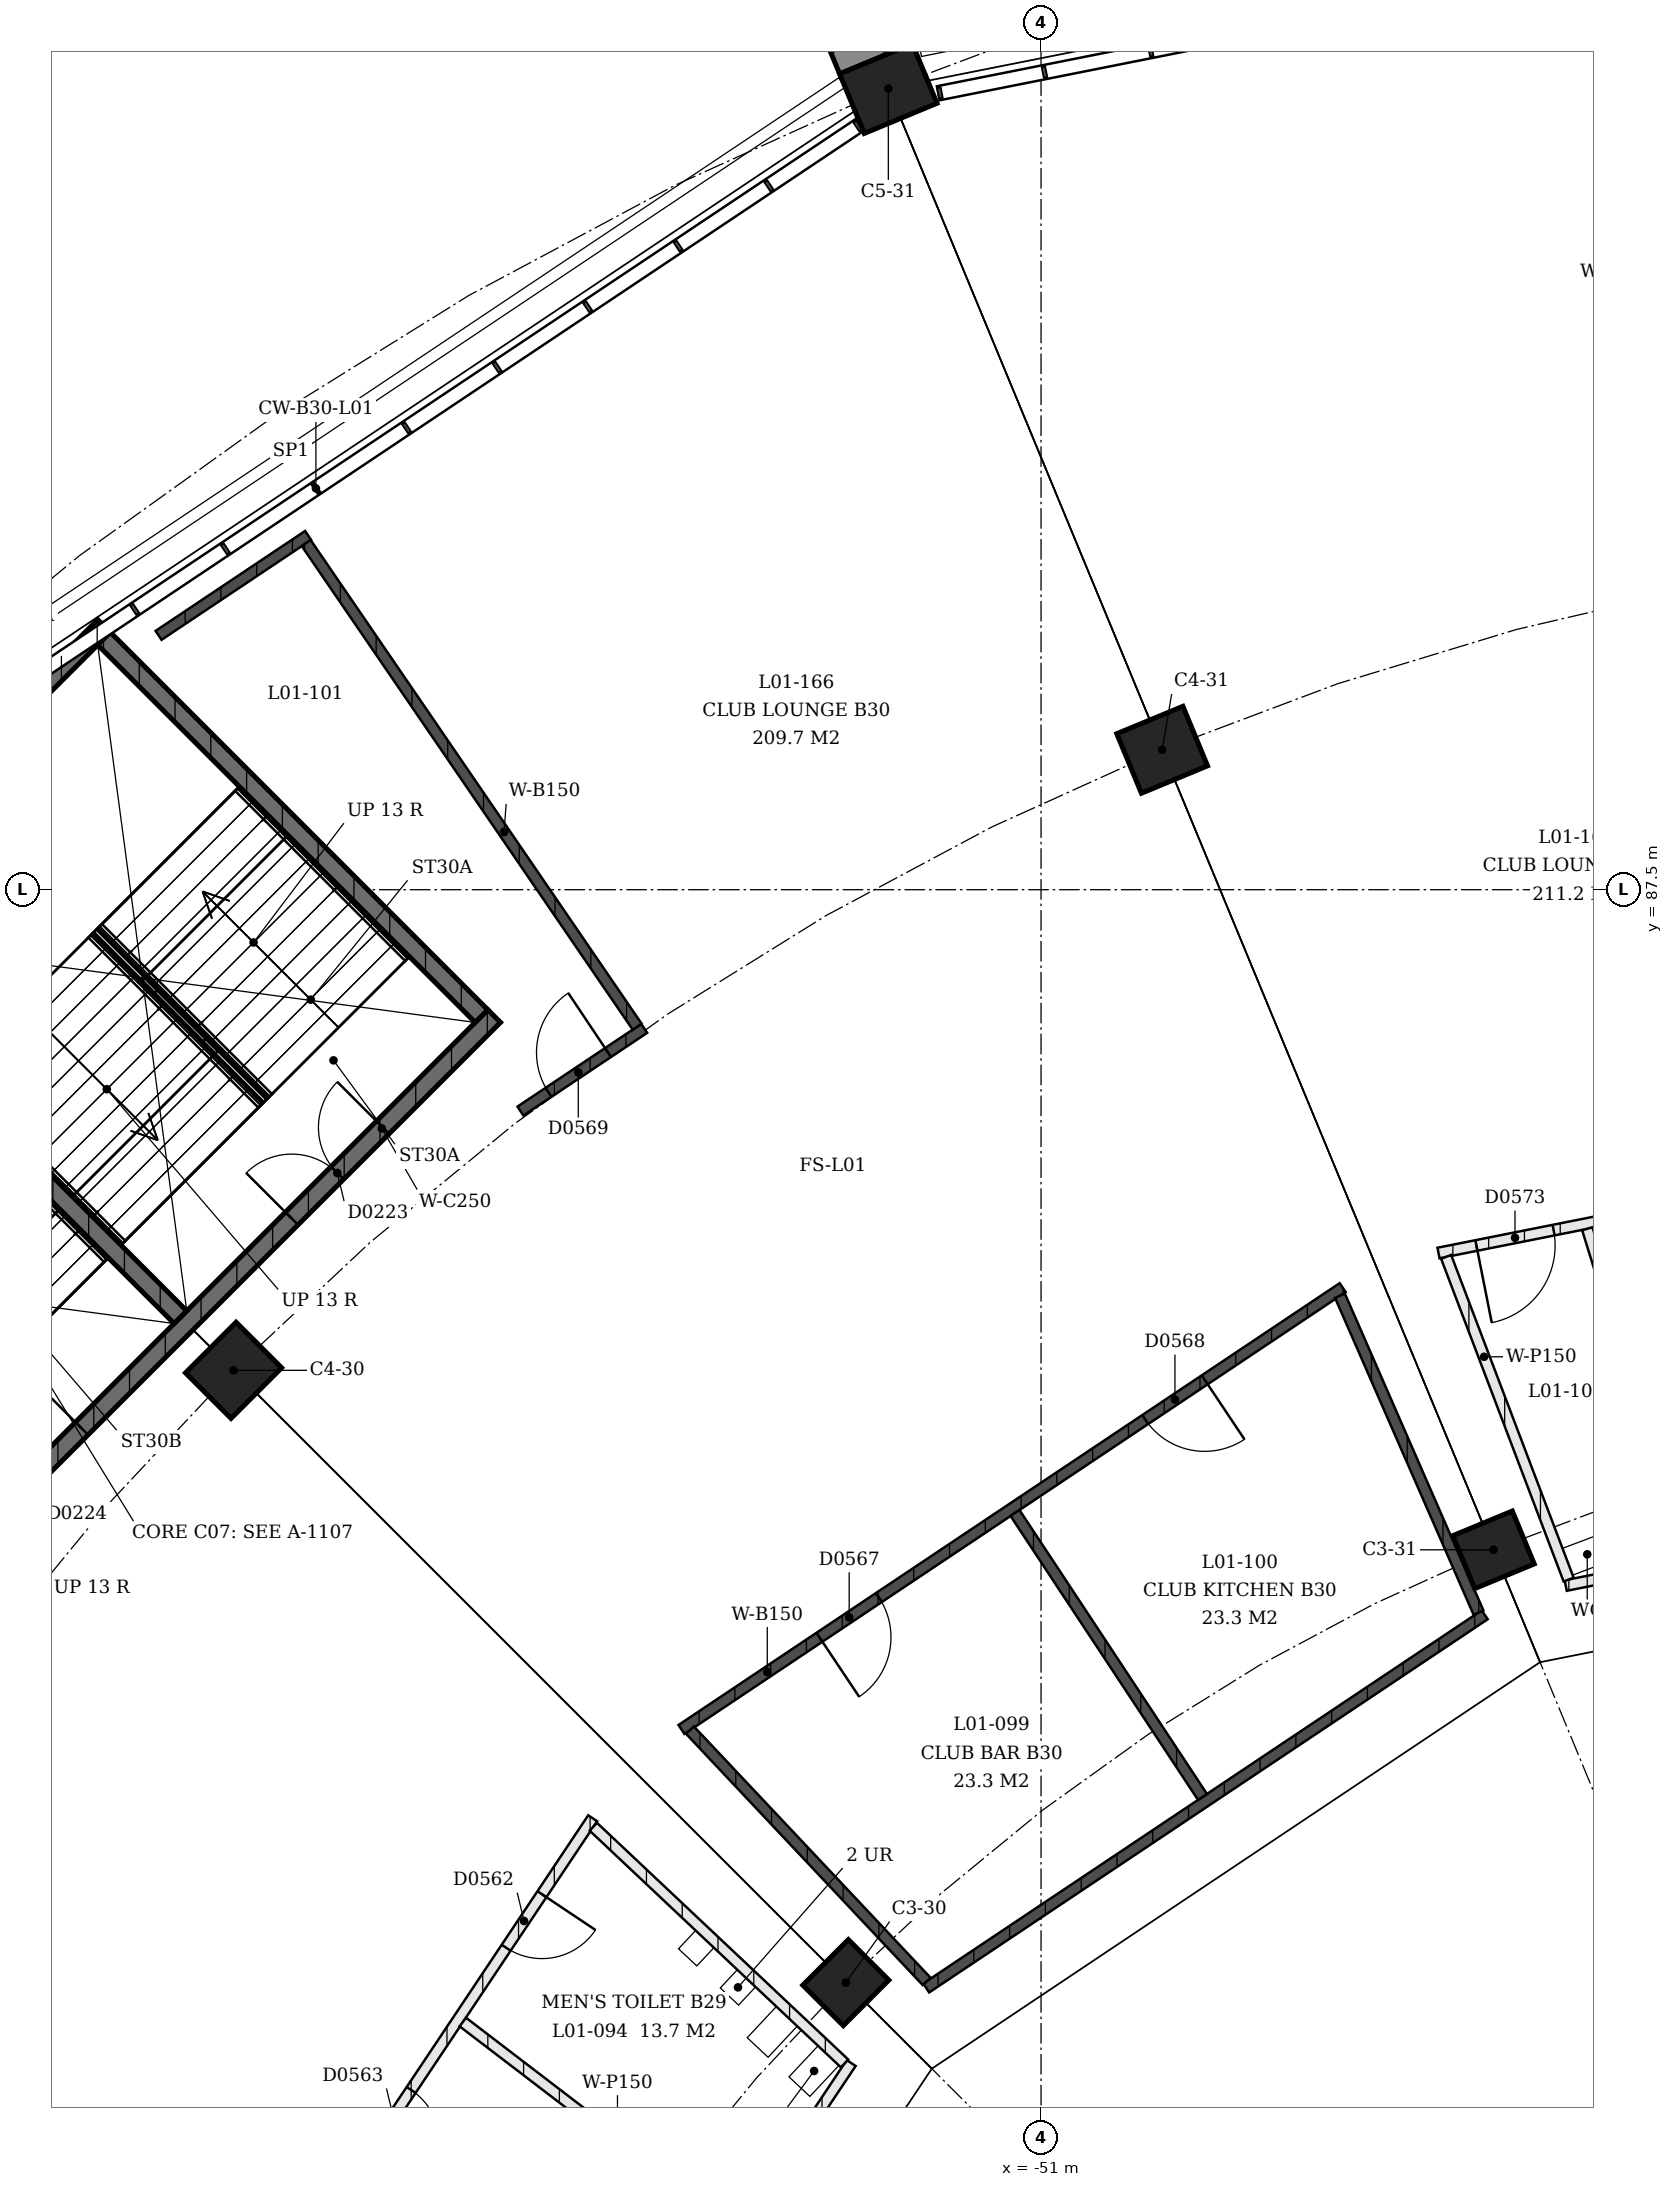
"""IFC4 building model, lengths in metres.
Left out: names, types, materials, properties, quantities, classifications, styles, units other than length and angle.
Written with IfcOpenShell. Run it as: python <this file> out.ifc"""

import sys

from ifc_helpers import new_model, si_unit, direction, frame, frame_2d, origin, origin_2d, place, context, subcontext, project, spatial, rectangle, extrude, element, fill, save


model = new_model("IFC4")
c1 = context("Model", 3, precision=1e-05, world=origin(), true_north=direction((0.0, 1.0)))
c2 = subcontext(c1, "Body", "Model", "MODEL_VIEW")
j1 = project(units=[si_unit("LENGTHUNIT", "METRE"), si_unit("PLANEANGLEUNIT", "RADIAN")], contexts=[c1])
p1 = place(None, origin())
s1 = spatial("IfcSite", under=j1, at=p1, CompositionType="ELEMENT")
p2 = place(p1, origin())
s2 = spatial("IfcBuilding", under=s1, at=p2, CompositionType="ELEMENT")
p3 = place(p2, frame((0.0, 0.0, 4.5)))
s3 = spatial("IfcBuildingStorey", under=s2, at=p3, CompositionType="ELEMENT", Elevation=4.5)
p4 = place(p3, frame((-53.728, 72.228, 0.0), z_axis=(0.0, 0.0, 1.0), x_axis=(-0.707106781187, -0.707106781187, 0.0)))
e1 = element("IfcColumn", 1, at=p4, inside=s3, PredefinedType="COLUMN", context=c2, shape_type="SweptSolid", body=[
    extrude(rectangle(XDim=0.9, YDim=0.8, at=origin_2d()), origin(), (0.0, 0.0, 1.0), 4.5),
])
p5 = place(p3, frame((-62.284, 80.784, 0.0), z_axis=(0.0, 0.0, 1.0), x_axis=(-0.707106781187, -0.707106781187, 0.0)))
e2 = element("IfcColumn", 2, at=p5, inside=s3, PredefinedType="COLUMN", context=c2, shape_type="SweptSolid", body=[
    extrude(rectangle(XDim=1.0, YDim=0.9, at=origin_2d()), origin(), (0.0, 0.0, 1.0), 4.5),
])
p6 = place(p3, frame((-44.677, 78.276, 0.0), z_axis=(0.0, 0.0, 1.0), x_axis=(-0.923879532511, -0.382683432365, 0.0)))
e3 = element("IfcColumn", 3, at=p6, inside=s3, PredefinedType="COLUMN", context=c2, shape_type="SweptSolid", body=[
    extrude(rectangle(XDim=0.9, YDim=0.8, at=origin_2d()), origin(), (0.0, 0.0, 1.0), 4.5),
])
p7 = place(p3, frame((-49.307, 89.455, 0.0), z_axis=(0.0, 0.0, 1.0), x_axis=(-0.923879532511, -0.382683432365, 0.0)))
e4 = element("IfcColumn", 4, at=p7, inside=s3, PredefinedType="COLUMN", context=c2, shape_type="SweptSolid", body=[
    extrude(rectangle(XDim=1.0, YDim=0.9, at=origin_2d()), origin(), (0.0, 0.0, 1.0), 4.5),
])
p8 = place(p3, frame((-53.134, 98.694, 0.0), z_axis=(0.0, 0.0, 1.0), x_axis=(-0.923879532511, -0.382683432365, 0.0)))
e5 = element("IfcColumn", 5, at=p8, inside=s3, PredefinedType="COLUMN", context=c2, shape_type="SweptSolid", body=[
    extrude(rectangle(XDim=1.1, YDim=0.9, at=origin_2d()), origin(), (0.0, 0.0, 1.0), 4.5),
])
p9 = place(p3, frame((-58.643, 85.734, 0.0), z_axis=(0.0, 0.0, 1.0), x_axis=(-0.707106781187, -0.707106781187, 0.0)))
e6 = element("IfcWall", 6, at=p9, inside=s3, PredefinedType="SHEAR", context=c2, shape_type="SweptSolid", body=[
    extrude(rectangle(XDim=12.15, YDim=0.25, at=frame_2d((6.075, 0.0))), origin(), (0.0, 0.0, 1.0), 4.09),
])
p10 = place(p9, frame((2.2, 0.0, 0.0)))
e7 = element("IfcOpeningElement", 7, at=p10, cuts=e6, PredefinedType="OPENING", context=c2, shape_type="SweptSolid", body=[
    extrude(rectangle(XDim=1.8, YDim=2.1, at=frame_2d((0.9, 1.05))), frame((0.0, 0.125, 0.0), z_axis=(0.0, -1.0, 0.0), x_axis=(1.0, 0.0, 0.0)), (0.0, 0.0, 1.0), 0.25),
])
p11 = place(p9, frame((8.15, 0.0, 0.0)))
e8 = element("IfcOpeningElement", 8, at=p11, cuts=e6, PredefinedType="OPENING", context=c2, shape_type="SweptSolid", body=[
    extrude(rectangle(XDim=1.8, YDim=2.1, at=frame_2d((0.9, 1.05))), frame((0.0, 0.125, 0.0), z_axis=(0.0, -1.0, 0.0), x_axis=(1.0, 0.0, 0.0)), (0.0, 0.0, 1.0), 0.25),
])
p12 = place(p3, frame((-64.094, 91.186, 0.0), z_axis=(0.0, 0.0, 1.0), x_axis=(-0.707106781187, -0.707106781187, 0.0)))
e9 = element("IfcWall", 9, at=p12, inside=s3, PredefinedType="SHEAR", context=c2, shape_type="SweptSolid", body=[
    extrude(rectangle(XDim=12.15, YDim=0.25, at=frame_2d((6.075, 0.0))), origin(), (0.0, 0.0, 1.0), 4.09),
])
p13 = place(p3, frame((-58.819, 85.734, 0.0), z_axis=(0.0, 0.0, 1.0), x_axis=(-0.707123144286, 0.707090417709, 0.0)))
e10 = element("IfcWall", 10, at=p13, inside=s3, PredefinedType="SHEAR", context=c2, shape_type="SweptSolid", body=[
    extrude(rectangle(XDim=7.46, YDim=0.25, at=frame_2d((3.73, 0.0))), origin(), (0.0, 0.0, 1.0), 4.09),
])
p14 = place(p3, frame((-63.027, 81.527, 0.0), z_axis=(0.0, 0.0, 1.0), x_axis=(-0.707106781187, 0.707106781187, 0.0)))
e11 = element("IfcWall", 11, at=p14, inside=s3, PredefinedType="SHEAR", context=c2, shape_type="SweptSolid", body=[
    extrude(rectangle(XDim=7.46, YDim=0.25, at=frame_2d((3.73, 0.0))), origin(), (0.0, 0.0, 1.0), 4.09),
])
p15 = place(p3, frame((-53.653, 71.105, 0.0), z_axis=(0.0, 0.0, 1.0), x_axis=(-0.555566497886, -0.831472108027, 0.0)))
e12 = element("IfcWall", 12, at=p15, inside=s3, PredefinedType="PARTITIONING", context=c2, shape_type="SweptSolid", body=[
    extrude(rectangle(XDim=9.102, YDim=0.15, at=frame_2d((4.551, 0.0))), origin(), (0.0, 0.0, 1.0), 3.0),
])
p16 = place(p3, frame((-57.266, 74.525, 0.0), z_axis=(0.0, 0.0, 1.0), x_axis=(-0.555562662276, -0.831474670862, 0.0)))
e13 = element("IfcWall", 13, at=p16, inside=s3, PredefinedType="PARTITIONING", context=c2, shape_type="SweptSolid", body=[
    extrude(rectangle(XDim=10.775, YDim=0.15, at=frame_2d((5.387, 0.0))), origin(), (0.0, 0.0, 1.0), 3.0),
])
p17 = place(p16, frame((1.276, 0.0, 0.0)))
e14 = element("IfcOpeningElement", 14, at=p17, cuts=e13, PredefinedType="OPENING", context=c2, shape_type="SweptSolid", body=[
    extrude(rectangle(XDim=0.9, YDim=2.1, at=frame_2d((0.45, 1.05))), frame((0.0, 0.075, 0.0), z_axis=(0.0, -1.0, 0.0), x_axis=(1.0, 0.0, 0.0)), (0.0, 0.0, 1.0), 0.15),
])
p18 = place(p16, frame((4.566, 0.0, 0.0)))
e15 = element("IfcOpeningElement", 15, at=p18, cuts=e13, PredefinedType="OPENING", context=c2, shape_type="SweptSolid", body=[
    extrude(rectangle(XDim=0.9, YDim=2.1, at=frame_2d((0.45, 1.05))), frame((0.0, 0.075, 0.0), z_axis=(0.0, -1.0, 0.0), x_axis=(1.0, 0.0, 0.0)), (0.0, 0.0, 1.0), 0.15),
])
p19 = place(p16, frame((7.119, 0.0, 0.0)))
e16 = element("IfcOpeningElement", 16, at=p19, cuts=e13, PredefinedType="OPENING", context=c2, shape_type="SweptSolid", body=[
    extrude(rectangle(XDim=1.1, YDim=2.1, at=frame_2d((0.55, 1.05))), frame((0.0, 0.075, 0.0), z_axis=(0.0, -1.0, 0.0), x_axis=(1.0, 0.0, 0.0)), (0.0, 0.0, 1.0), 0.15),
])
p20 = place(p16, frame((9.135, 0.0, 0.0)))
e17 = element("IfcOpeningElement", 17, at=p20, cuts=e13, PredefinedType="OPENING", context=c2, shape_type="SweptSolid", body=[
    extrude(rectangle(XDim=1.1, YDim=2.1, at=frame_2d((0.55, 1.05))), frame((0.0, 0.075, 0.0), z_axis=(0.0, -1.0, 0.0), x_axis=(1.0, 0.0, 0.0)), (0.0, 0.0, 1.0), 0.15),
])
p21 = place(p3, frame((-53.746, 71.099, 0.0), z_axis=(0.0, 0.0, 1.0), x_axis=(-0.727898273696, 0.685685134118, 0.0)))
e18 = element("IfcWall", 18, at=p21, inside=s3, PredefinedType="PARTITIONING", context=c2, shape_type="SweptSolid", body=[
    extrude(rectangle(XDim=4.823, YDim=0.15, at=frame_2d((2.412, 0.0))), origin(), (0.0, 0.0, 1.0), 3.0),
])
p22 = place(p3, frame((-55.294, 68.782, 0.0), z_axis=(0.0, 0.0, 1.0), x_axis=(-0.794378186515, 0.607423490482, 0.0)))
e19 = element("IfcWall", 19, at=p22, inside=s3, PredefinedType="PARTITIONING", context=c2, shape_type="SweptSolid", body=[
    extrude(rectangle(XDim=4.766, YDim=0.15, at=frame_2d((2.383, 0.0))), origin(), (0.0, 0.0, 1.0), 3.0),
])
p23 = place(p3, frame((-52.605, 72.153, 0.0), z_axis=(0.0, 0.0, 1.0), x_axis=(0.831461674059, 0.555582113257, 0.0)))
e20 = element("IfcWall", 20, at=p23, inside=s3, PredefinedType="SOLIDWALL", context=c2, shape_type="SweptSolid", body=[
    extrude(rectangle(XDim=9.388, YDim=0.15, at=frame_2d((4.694, 0.0))), origin(), (0.0, 0.0, 1.0), 3.0),
])
p24 = place(p3, frame((-56.025, 75.766, 0.0), z_axis=(0.0, 0.0, 1.0), x_axis=(0.831478677095, 0.55555666636, 0.0)))
e21 = element("IfcWall", 21, at=p24, inside=s3, PredefinedType="SOLIDWALL", context=c2, shape_type="SweptSolid", body=[
    extrude(rectangle(XDim=11.113, YDim=0.15, at=frame_2d((5.557, 0.0))), origin(), (0.0, 0.0, 1.0), 3.0),
])
p25 = place(p24, frame((2.319, 0.0, 0.0)))
e22 = element("IfcOpeningElement", 22, at=p25, cuts=e21, PredefinedType="OPENING", context=c2, shape_type="SweptSolid", body=[
    extrude(rectangle(XDim=1.0, YDim=2.1, at=frame_2d((0.5, 1.05))), frame((0.0, 0.075, 0.0), z_axis=(0.0, -1.0, 0.0), x_axis=(1.0, 0.0, 0.0)), (0.0, 0.0, 1.0), 0.15),
])
p26 = place(p24, frame((7.794, 0.0, 0.0)))
e23 = element("IfcOpeningElement", 23, at=p26, cuts=e21, PredefinedType="OPENING", context=c2, shape_type="SweptSolid", body=[
    extrude(rectangle(XDim=1.0, YDim=2.1, at=frame_2d((0.5, 1.05))), frame((0.0, 0.075, 0.0), z_axis=(0.0, -1.0, 0.0), x_axis=(1.0, 0.0, 0.0)), (0.0, 0.0, 1.0), 0.15),
])
p27 = place(p3, frame((-52.599, 72.246, 0.0), z_axis=(0.0, 0.0, 1.0), x_axis=(-0.685685134118, 0.727898273696, 0.0)))
e24 = element("IfcWall", 24, at=p27, inside=s3, PredefinedType="SOLIDWALL", context=c2, shape_type="SweptSolid", body=[
    extrude(rectangle(XDim=4.823, YDim=0.15, at=frame_2d((2.412, 0.0))), origin(), (0.0, 0.0, 1.0), 3.0),
])
p28 = place(p3, frame((-48.743, 74.822, 0.0), z_axis=(0.0, 0.0, 1.0), x_axis=(-0.551118175735, 0.834427202561, 0.0)))
e25 = element("IfcWall", 25, at=p28, inside=s3, PredefinedType="SOLIDWALL", context=c2, shape_type="SweptSolid", body=[
    extrude(rectangle(XDim=4.757, YDim=0.15, at=frame_2d((2.378, 0.0))), origin(), (0.0, 0.0, 1.0), 3.0),
])
p29 = place(p3, frame((-44.886, 77.399, 0.0), z_axis=(0.0, 0.0, 1.0), x_axis=(-0.400646552146, 0.916232688924, 0.0)))
e26 = element("IfcWall", 26, at=p29, inside=s3, PredefinedType="SOLIDWALL", context=c2, shape_type="SweptSolid", body=[
    extrude(rectangle(XDim=4.832, YDim=0.15, at=frame_2d((2.416, 0.0))), origin(), (0.0, 0.0, 1.0), 3.0),
])
p30 = place(p3, frame((-58.275, 84.407, 0.0), z_axis=(0.0, 0.0, 1.0), x_axis=(0.831526298134, 0.555485387307, 0.0)))
e27 = element("IfcWall", 27, at=p30, inside=s3, PredefinedType="SOLIDWALL", context=c2, shape_type="SweptSolid", body=[
    extrude(rectangle(XDim=2.08, YDim=0.15, at=frame_2d((1.04, 0.0))), origin(), (0.0, 0.0, 1.0), 3.0),
])
p31 = place(p30, frame((0.472, 0.0, 0.0)))
e28 = element("IfcOpeningElement", 28, at=p31, cuts=e27, PredefinedType="OPENING", context=c2, shape_type="SweptSolid", body=[
    extrude(rectangle(XDim=1.0, YDim=2.1, at=frame_2d((0.5, 1.05))), frame((0.0, 0.075, 0.0), z_axis=(0.0, -1.0, 0.0), x_axis=(1.0, 0.0, 0.0)), (0.0, 0.0, 1.0), 0.15),
])
p32 = place(p3, frame((-63.333, 91.054, 0.0), z_axis=(0.0, 0.0, 1.0), x_axis=(0.831482054195, 0.555551611961, 0.0)))
e29 = element("IfcWall", 29, at=p32, inside=s3, PredefinedType="SOLIDWALL", context=c2, shape_type="SweptSolid", body=[
    extrude(rectangle(XDim=2.514, YDim=0.15, at=frame_2d((1.257, 0.0))), origin(), (0.0, 0.0, 1.0), 3.0),
])
p33 = place(p3, frame((-56.644, 85.585, 0.0), z_axis=(0.0, 0.0, 1.0), x_axis=(-0.564785434986, 0.825237791444, 0.0)))
e30 = element("IfcWall", 30, at=p33, inside=s3, PredefinedType="SOLIDWALL", context=c2, shape_type="SweptSolid", body=[
    extrude(rectangle(XDim=8.19, YDim=0.15, at=frame_2d((4.095, 0.0))), origin(), (0.0, 0.0, 1.0), 3.0),
])
p34 = place(p3, frame((-34.741, 79.552, 0.0), z_axis=(0.0, 0.0, 1.0), x_axis=(-0.980786464492, -0.195084369103, 0.0)))
e31 = element("IfcWall", 31, at=p34, inside=s3, PredefinedType="PARTITIONING", context=c2, shape_type="SweptSolid", body=[
    extrude(rectangle(XDim=9.102, YDim=0.15, at=frame_2d((4.551, 0.0))), origin(), (0.0, 0.0, 1.0), 3.0),
])
p35 = place(p3, frame((-34.877, 84.525, 0.0), z_axis=(0.0, 0.0, 1.0), x_axis=(-0.98078580384, -0.195087690502, 0.0)))
e32 = element("IfcWall", 32, at=p35, inside=s3, PredefinedType="PARTITIONING", context=c2, shape_type="SweptSolid", body=[
    extrude(rectangle(XDim=10.775, YDim=0.15, at=frame_2d((5.387, 0.0))), origin(), (0.0, 0.0, 1.0), 3.0),
])
p36 = place(p35, frame((1.276, 0.0, 0.0)))
e33 = element("IfcOpeningElement", 33, at=p36, cuts=e32, PredefinedType="OPENING", context=c2, shape_type="SweptSolid", body=[
    extrude(rectangle(XDim=0.9, YDim=2.1, at=frame_2d((0.45, 1.05))), frame((0.0, 0.075, 0.0), z_axis=(0.0, -1.0, 0.0), x_axis=(1.0, 0.0, 0.0)), (0.0, 0.0, 1.0), 0.15),
])
p37 = place(p35, frame((4.566, 0.0, 0.0)))
e34 = element("IfcOpeningElement", 34, at=p37, cuts=e32, PredefinedType="OPENING", context=c2, shape_type="SweptSolid", body=[
    extrude(rectangle(XDim=0.9, YDim=2.1, at=frame_2d((0.45, 1.05))), frame((0.0, 0.075, 0.0), z_axis=(0.0, -1.0, 0.0), x_axis=(1.0, 0.0, 0.0)), (0.0, 0.0, 1.0), 0.15),
])
p38 = place(p35, frame((7.119, 0.0, 0.0)))
e35 = element("IfcOpeningElement", 35, at=p38, cuts=e32, PredefinedType="OPENING", context=c2, shape_type="SweptSolid", body=[
    extrude(rectangle(XDim=1.1, YDim=2.1, at=frame_2d((0.55, 1.05))), frame((0.0, 0.075, 0.0), z_axis=(0.0, -1.0, 0.0), x_axis=(1.0, 0.0, 0.0)), (0.0, 0.0, 1.0), 0.15),
])
p39 = place(p35, frame((9.135, 0.0, 0.0)))
e36 = element("IfcOpeningElement", 36, at=p39, cuts=e32, PredefinedType="OPENING", context=c2, shape_type="SweptSolid", body=[
    extrude(rectangle(XDim=1.1, YDim=2.1, at=frame_2d((0.55, 1.05))), frame((0.0, 0.075, 0.0), z_axis=(0.0, -1.0, 0.0), x_axis=(1.0, 0.0, 0.0)), (0.0, 0.0, 1.0), 0.15),
])
p40 = place(p3, frame((-41.952, 78.193, 0.0), z_axis=(0.0, 0.0, 1.0), x_axis=(-0.295678182088, 0.955287607288, 0.0)))
e37 = element("IfcWall", 37, at=p40, inside=s3, PredefinedType="PARTITIONING", context=c2, shape_type="SweptSolid", body=[
    extrude(rectangle(XDim=4.782, YDim=0.15, at=frame_2d((2.391, 0.0))), origin(), (0.0, 0.0, 1.0), 3.0),
])
p41 = place(p3, frame((-43.627, 77.86, 0.0), z_axis=(0.0, 0.0, 1.0), x_axis=(-0.354909029819, 0.934900839957, 0.0)))
e38 = element("IfcWall", 38, at=p41, inside=s3, PredefinedType="PARTITIONING", context=c2, shape_type="SweptSolid", body=[
    extrude(rectangle(XDim=4.823, YDim=0.15, at=frame_2d((2.412, 0.0))), origin(), (0.0, 0.0, 1.0), 3.0),
])
p42 = place(p10, origin())
e39 = element("IfcDoor", 39, at=p42, inside=s3, OperationType="DOUBLE_DOOR_SINGLE_SWING", PredefinedType="DOOR", context=c2, shape_type="SweptSolid", body=[
    extrude(rectangle(XDim=1.8, YDim=2.1, at=frame_2d((0.9, 1.05))), frame((0.0, 0.025, 0.0), z_axis=(0.0, -1.0, 0.0), x_axis=(1.0, 0.0, 0.0)), (0.0, 0.0, 1.0), 0.05),
])
fill(e7, e39)
p43 = place(p11, origin())
e40 = element("IfcDoor", 40, at=p43, inside=s3, OperationType="DOUBLE_DOOR_SINGLE_SWING", PredefinedType="DOOR", context=c2, shape_type="SweptSolid", body=[
    extrude(rectangle(XDim=1.8, YDim=2.1, at=frame_2d((0.9, 1.05))), frame((0.0, 0.025, 0.0), z_axis=(0.0, -1.0, 0.0), x_axis=(1.0, 0.0, 0.0)), (0.0, 0.0, 1.0), 0.05),
])
fill(e8, e40)
p44 = place(p17, origin())
e41 = element("IfcDoor", 41, at=p44, inside=s3, OperationType="SINGLE_SWING_RIGHT", PredefinedType="DOOR", context=c2, shape_type="SweptSolid", body=[
    extrude(rectangle(XDim=0.9, YDim=2.1, at=frame_2d((0.45, 1.05))), frame((0.0, 0.025, 0.0), z_axis=(0.0, -1.0, 0.0), x_axis=(1.0, 0.0, 0.0)), (0.0, 0.0, 1.0), 0.05),
])
fill(e14, e41)
p45 = place(p18, origin())
e42 = element("IfcDoor", 42, at=p45, inside=s3, OperationType="SINGLE_SWING_LEFT", PredefinedType="DOOR", context=c2, shape_type="SweptSolid", body=[
    extrude(rectangle(XDim=0.9, YDim=2.1, at=frame_2d((0.45, 1.05))), frame((0.0, 0.025, 0.0), z_axis=(0.0, -1.0, 0.0), x_axis=(1.0, 0.0, 0.0)), (0.0, 0.0, 1.0), 0.05),
])
fill(e15, e42)
p46 = place(p25, origin())
e43 = element("IfcDoor", 43, at=p46, inside=s3, OperationType="SINGLE_SWING_LEFT", PredefinedType="DOOR", context=c2, shape_type="SweptSolid", body=[
    extrude(rectangle(XDim=1.0, YDim=2.1, at=frame_2d((0.5, 1.05))), frame((0.0, 0.025, 0.0), z_axis=(0.0, -1.0, 0.0), x_axis=(1.0, 0.0, 0.0)), (0.0, 0.0, 1.0), 0.05),
])
fill(e22, e43)
p47 = place(p26, origin())
e44 = element("IfcDoor", 44, at=p47, inside=s3, OperationType="SINGLE_SWING_RIGHT", PredefinedType="DOOR", context=c2, shape_type="SweptSolid", body=[
    extrude(rectangle(XDim=1.0, YDim=2.1, at=frame_2d((0.5, 1.05))), frame((0.0, 0.025, 0.0), z_axis=(0.0, -1.0, 0.0), x_axis=(1.0, 0.0, 0.0)), (0.0, 0.0, 1.0), 0.05),
])
fill(e23, e44)
p48 = place(p31, origin())
e45 = element("IfcDoor", 45, at=p48, inside=s3, OperationType="SINGLE_SWING_LEFT", PredefinedType="DOOR", context=c2, shape_type="SweptSolid", body=[
    extrude(rectangle(XDim=1.0, YDim=2.1, at=frame_2d((0.5, 1.05))), frame((0.0, 0.025, 0.0), z_axis=(0.0, -1.0, 0.0), x_axis=(1.0, 0.0, 0.0)), (0.0, 0.0, 1.0), 0.05),
])
fill(e28, e45)
p49 = place(p39, origin())
e46 = element("IfcDoor", 46, at=p49, inside=s3, OperationType="SINGLE_SWING_LEFT", PredefinedType="DOOR", context=c2, shape_type="SweptSolid", body=[
    extrude(rectangle(XDim=1.1, YDim=2.1, at=frame_2d((0.55, 1.05))), frame((0.0, 0.025, 0.0), z_axis=(0.0, -1.0, 0.0), x_axis=(1.0, 0.0, 0.0)), (0.0, 0.0, 1.0), 0.05),
])
fill(e36, e46)
save(model, sys.argv[1])
